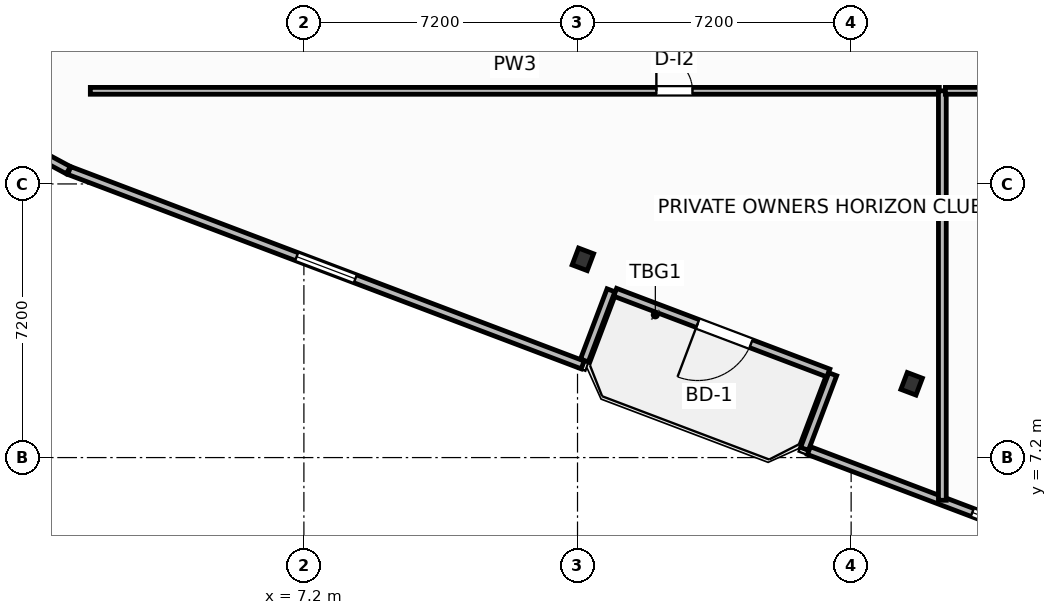
"""IFC4 building model, lengths in metres.
Left out: names, types, materials, properties, quantities, classifications, styles, units other than length and angle.
Written with IfcOpenShell. Run it as: python <this file> out.ifc"""

import sys

from ifc_helpers import new_model, si_unit, direction, frame, frame_2d, origin, origin_2d, place, context, subcontext, project, spatial, rectangle, i_section, extrude, element, fill, save


model = new_model("IFC4")
c1 = context("Model", 3, precision=1e-05, world=origin(), true_north=direction((0.0, 1.0)))
c2 = subcontext(c1, "Body", "Model", "MODEL_VIEW")
j1 = project(units=[si_unit("LENGTHUNIT", "METRE"), si_unit("PLANEANGLEUNIT", "RADIAN")], contexts=[c1])
p1 = place(None, origin())
s1 = spatial("IfcSite", under=j1, at=p1, CompositionType="ELEMENT")
p2 = place(p1, origin())
s2 = spatial("IfcBuilding", under=s1, at=p2, CompositionType="ELEMENT")
p3 = place(p2, frame((0.0, 0.0, 98.4)))
s3 = spatial("IfcBuildingStorey", under=s2, at=p3, CompositionType="ELEMENT", Elevation=98.4)
for number, where, z_axis, x_axis in (
    (1, (14.541, 12.416, 0.0), (0.0, 0.0, 1.0), (0.935, -0.354, 0.0)),
    (2, (23.192, 9.141, 0.0), (0.0, 0.0, 1.0), (0.935, -0.354, 0.0)),
):
    element("IfcColumn", number, at=place(p3, frame(where, z_axis=z_axis, x_axis=x_axis)), inside=s3, PredefinedType="COLUMN", context=c2, shape_type="SweptSolid", body=[
        extrude(i_section(OverallWidth=0.424, OverallDepth=0.474, WebThickness=0.048, FlangeThickness=0.077, FilletRadius=0.025, at=origin_2d()), origin(), (0.0, 0.0, 1.0), 3.7),
    ])
p4 = place(p3, frame((21.0, 9.425, 0.0), z_axis=(0.0, 0.0, 1.0), x_axis=(-0.93521416643, 0.354082565101, 0.0)))
e3 = element("IfcWall", 3, at=p4, inside=s3, PredefinedType="SOLIDWALL", context=c2, shape_type="SweptSolid", body=[
    extrude(rectangle(XDim=6.0, YDim=0.22, at=frame_2d((3.0, 0.0))), origin(), (0.0, 0.0, 1.0), 2.73),
])
p5 = place(p4, frame((2.176, 0.0, 0.0)))
e4 = element("IfcOpeningElement", 4, at=p5, cuts=e3, PredefinedType="OPENING", context=c2, shape_type="SweptSolid", body=[
    extrude(rectangle(XDim=1.5, YDim=2.25, at=frame_2d((0.75, 1.125))), frame((0.0, 0.12, 0.0), z_axis=(0.0, -1.0, 0.0), x_axis=(1.0, 0.0, 0.0)), (0.0, 0.0, 1.0), 0.24),
])
p6 = place(p3, frame((-0.197, 15.406, 0.0), z_axis=(0.0, 0.0, 1.0), x_axis=(0.881023507585, -0.47307248819, 0.0)))
e5 = element("IfcWall", 5, at=p6, inside=s3, PredefinedType="SOLIDWALL", context=c2, shape_type="SweptSolid", body=[
    extrude(rectangle(XDim=1.361, YDim=0.22, at=frame_2d((0.68, 0.0))), origin(), (0.0, 0.0, 1.0), 2.73),
])
p7 = place(p3, frame((1.026, 14.753, 0.0), z_axis=(0.0, 0.0, 1.0), x_axis=(0.935222448475, -0.354060689526, 0.0)))
e6 = element("IfcWall", 6, at=p7, inside=s3, PredefinedType="SOLIDWALL", context=c2, shape_type="SweptSolid", body=[
    extrude(rectangle(XDim=14.447, YDim=0.22, at=frame_2d((7.224, 0.0))), origin(), (0.0, 0.0, 1.0), 2.73),
])
p8 = place(p7, frame((6.399, 0.0, 0.8)))
e7 = element("IfcOpeningElement", 7, at=p8, cuts=e6, PredefinedType="OPENING", context=c2, shape_type="SweptSolid", body=[
    extrude(rectangle(XDim=1.65, YDim=1.65, at=frame_2d((0.825, 0.825))), frame((0.0, 0.12, 0.0), z_axis=(0.0, -1.0, 0.0), x_axis=(1.0, 0.0, 0.0)), (0.0, 0.0, 1.0), 0.24),
])
p9 = place(p3, frame((14.581, 9.755, 0.0), z_axis=(0.0, 0.0, 1.0), x_axis=(0.354061611705, 0.935222099352, 0.0)))
e8 = element("IfcWall", 8, at=p9, inside=s3, PredefinedType="SOLIDWALL", context=c2, shape_type="SweptSolid", body=[
    extrude(rectangle(XDim=1.975, YDim=0.22, at=frame_2d((0.987, 0.0))), origin(), (0.0, 0.0, 1.0), 2.73),
])
p10 = place(p3, frame((21.116, 9.392, 0.0), z_axis=(0.0, 0.0, 1.0), x_axis=(-0.353988291547, -0.935249854022, 0.0)))
e9 = element("IfcWall", 9, at=p10, inside=s3, PredefinedType="SOLIDWALL", context=c2, shape_type="SweptSolid", body=[
    extrude(rectangle(XDim=2.1, YDim=0.22, at=frame_2d((1.05, 0.0))), origin(), (0.0, 0.0, 1.0), 2.73),
])
p11 = place(p3, frame((20.49, 7.384, 0.0), z_axis=(0.0, 0.0, 1.0), x_axis=(0.935230796934, -0.354038636968, 0.0)))
e10 = element("IfcWall", 10, at=p11, inside=s3, PredefinedType="SOLIDWALL", context=c2, shape_type="SweptSolid", body=[
    extrude(rectangle(XDim=8.035, YDim=0.22, at=frame_2d((4.018, 0.0))), origin(), (0.0, 0.0, 1.0), 2.73),
])
p12 = place(p11, frame((4.597, 0.0, 0.8)))
e11 = element("IfcOpeningElement", 11, at=p12, cuts=e10, PredefinedType="OPENING", context=c2, shape_type="SweptSolid", body=[
    extrude(rectangle(XDim=1.65, YDim=1.65, at=frame_2d((0.825, 0.825))), frame((0.0, 0.12, 0.0), z_axis=(0.0, -1.0, 0.0), x_axis=(1.0, 0.0, 0.0)), (0.0, 0.0, 1.0), 0.24),
])
p13 = place(p3, frame((1.58, 16.85, 0.0), z_axis=(0.0, 0.0, 1.0), x_axis=(1.0, 0.0, 0.0)))
e12 = element("IfcWall", 12, at=p13, inside=s3, PredefinedType="PARTITIONING", context=c2, shape_type="SweptSolid", body=[
    extrude(rectangle(XDim=22.34, YDim=0.18, at=frame_2d((11.17, 0.0))), origin(), (0.0, 0.0, 1.0), 3.45),
])
p14 = place(p13, frame((14.895, 0.0, 0.0)))
e13 = element("IfcOpeningElement", 13, at=p14, cuts=e12, PredefinedType="OPENING", context=c2, shape_type="SweptSolid", body=[
    extrude(rectangle(XDim=0.95, YDim=2.05, at=frame_2d((0.475, 1.025))), frame((0.0, 0.1, 0.0), z_axis=(0.0, -1.0, 0.0), x_axis=(1.0, 0.0, 0.0)), (0.0, 0.0, 1.0), 0.2),
])
p15 = place(p3, frame((24.0, 6.076, 0.0), z_axis=(0.0, 0.0, 1.0), x_axis=(0.0, 1.0, 0.0)))
e14 = element("IfcWall", 14, at=p15, inside=s3, PredefinedType="PARTITIONING", context=c2, shape_type="SweptSolid", body=[
    extrude(rectangle(XDim=10.774, YDim=0.205, at=frame_2d((5.387, 0.0))), origin(), (0.0, 0.0, 1.0), 2.58),
])
p16 = place(p3, frame((24.08, 16.85, 0.0), z_axis=(0.0, 0.0, 1.0), x_axis=(1.0, 0.0, 0.0)))
e15 = element("IfcWall", 15, at=p16, inside=s3, PredefinedType="PARTITIONING", context=c2, shape_type="SweptSolid", body=[
    extrude(rectangle(XDim=15.04, YDim=0.18, at=frame_2d((7.52, 0.0))), origin(), (0.0, 0.0, 1.0), 3.45),
])
p17 = place(p16, frame((7.045, 0.0, 0.0)))
e16 = element("IfcOpeningElement", 16, at=p17, cuts=e15, PredefinedType="OPENING", context=c2, shape_type="SweptSolid", body=[
    extrude(rectangle(XDim=0.95, YDim=2.05, at=frame_2d((0.475, 1.025))), frame((0.0, 0.1, 0.0), z_axis=(0.0, -1.0, 0.0), x_axis=(1.0, 0.0, 0.0)), (0.0, 0.0, 1.0), 0.2),
])
p18 = place(p5, origin())
e17 = element("IfcDoor", 17, at=p18, inside=s3, OperationType="SINGLE_SWING_RIGHT", PredefinedType="DOOR", context=c2, shape_type="SweptSolid", body=[
    extrude(rectangle(XDim=1.5, YDim=2.25, at=frame_2d((0.75, 1.125))), frame((0.0, 0.025, 0.0), z_axis=(0.0, -1.0, 0.0), x_axis=(1.0, 0.0, 0.0)), (0.0, 0.0, 1.0), 0.05),
])
fill(e4, e17)
p19 = place(p8, origin())
e18 = element("IfcWindow", 18, at=p19, inside=s3, PartitioningType="SINGLE_PANEL", PredefinedType="WINDOW", context=c2, shape_type="SweptSolid", body=[
    extrude(rectangle(XDim=1.65, YDim=1.65, at=frame_2d((0.825, 0.825))), frame((0.0, 0.03, 0.0), z_axis=(0.0, -1.0, 0.0), x_axis=(1.0, 0.0, 0.0)), (0.0, 0.0, 1.0), 0.06),
])
fill(e7, e18)
p20 = place(p12, origin())
e19 = element("IfcWindow", 19, at=p20, inside=s3, PartitioningType="SINGLE_PANEL", PredefinedType="WINDOW", context=c2, shape_type="SweptSolid", body=[
    extrude(rectangle(XDim=1.65, YDim=1.65, at=frame_2d((0.825, 0.825))), frame((0.0, 0.03, 0.0), z_axis=(0.0, -1.0, 0.0), x_axis=(1.0, 0.0, 0.0)), (0.0, 0.0, 1.0), 0.06),
])
fill(e11, e19)
p21 = place(p14, origin())
e20 = element("IfcDoor", 20, at=p21, inside=s3, OperationType="SINGLE_SWING_LEFT", PredefinedType="DOOR", context=c2, shape_type="SweptSolid", body=[
    extrude(rectangle(XDim=0.95, YDim=2.05, at=frame_2d((0.475, 1.025))), frame((0.0, 0.025, 0.0), z_axis=(0.0, -1.0, 0.0), x_axis=(1.0, 0.0, 0.0)), (0.0, 0.0, 1.0), 0.05),
])
fill(e13, e20)
save(model, sys.argv[1])
